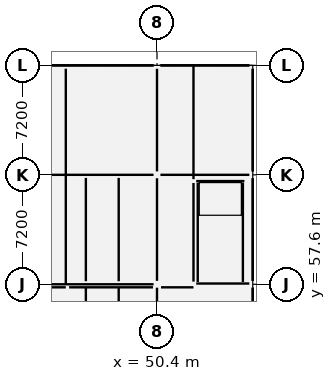
"""IFC4 building model, lengths in metres.
Left out: names, types, materials, properties, quantities, classifications, styles, units other than length and angle.
Written with IfcOpenShell. Run it as: python <this file> out.ifc"""

import sys

from ifc_helpers import new_model, si_unit, direction, frame, frame_2d, origin, origin_2d, place, context, subcontext, project, spatial, rectangle, extrude, element, fill, save


model = new_model("IFC4")
c1 = context("Model", 3, precision=1e-05, world=origin(), true_north=direction((0.0, 1.0)))
c2 = subcontext(c1, "Body", "Model", "MODEL_VIEW")
j1 = project(units=[si_unit("LENGTHUNIT", "METRE"), si_unit("PLANEANGLEUNIT", "RADIAN")], contexts=[c1])
p1 = place(None, origin())
s1 = spatial("IfcSite", under=j1, at=p1, CompositionType="ELEMENT")
p2 = place(p1, origin())
s2 = spatial("IfcBuilding", under=s1, at=p2, CompositionType="ELEMENT")
p3 = place(p2, frame((0.0, 0.0, 5.4)))
s3 = spatial("IfcBuildingStorey", under=s2, at=p3, CompositionType="ELEMENT", Elevation=5.4)
for number, where, z_axis, x_axis in (
    (1, (50.4, 57.6, 0.0), (0.0, 0.0, 1.0), (1.0, 0.0, 0.0)),
    (2, (50.4, 64.8, 0.0), (0.0, 0.0, 1.0), (1.0, 0.0, 0.0)),
    (3, (50.4, 72.0, 0.0), (0.0, 0.0, 1.0), (1.0, 0.0, 0.0)),
    (4, (56.7, 57.6, 0.0), (0.0, 0.0, 1.0), (1.0, 0.0, 0.0)),
    (5, (56.7, 64.8, 0.0), (0.0, 0.0, 1.0), (1.0, 0.0, 0.0)),
    (6, (56.7, 72.0, 0.0), (0.0, 0.0, 1.0), (1.0, 0.0, 0.0)),
):
    element("IfcColumn", number, at=place(p3, frame(where, z_axis=z_axis, x_axis=x_axis)), inside=s3, PredefinedType="COLUMN", context=c2, shape_type="SweptSolid", body=[
        extrude(rectangle(XDim=0.45, YDim=0.45, at=origin_2d()), origin(), (0.0, 0.0, 1.0), 4.2),
    ])
p4 = place(p3, frame((52.98, 57.65, 0.0), z_axis=(0.0, 0.0, 1.0), x_axis=(1.0, 0.0, 0.0)))
e7 = element("IfcWall", 7, at=p4, inside=s3, PredefinedType="SHEAR", context=c2, shape_type="SweptSolid", body=[
    extrude(rectangle(XDim=3.495, YDim=0.2, at=frame_2d((1.748, 0.0))), origin(), (0.0, 0.0, 1.0), 3.95),
])
p5 = place(p4, frame((1.198, 0.0, 0.0)))
e8 = element("IfcOpeningElement", 8, at=p5, cuts=e7, PredefinedType="OPENING", context=c2, shape_type="SweptSolid", body=[
    extrude(rectangle(XDim=1.1, YDim=2.15, at=frame_2d((0.55, 1.075))), frame((0.0, 0.112, 0.0), z_axis=(0.0, -1.0, 0.0), x_axis=(1.0, 0.0, 0.0)), (0.0, 0.0, 1.0), 0.224),
])
p6 = place(p3, frame((52.98, 64.39, 0.0), z_axis=(0.0, 0.0, 1.0), x_axis=(1.0, 0.0, 0.0)))
e9 = element("IfcWall", 9, at=p6, inside=s3, PredefinedType="SHEAR", context=c2, shape_type="SweptSolid", body=[
    extrude(rectangle(XDim=3.17, YDim=0.2, at=frame_2d((1.585, 0.0))), origin(), (0.0, 0.0, 1.0), 3.95),
])
for number, where, z_axis, x_axis in (
    (10, (53.08, 57.75, 0.0), (0.0, 0.0, 1.0), (0.0, 1.0, 0.0)),
    (11, (56.05, 57.75, 0.0), (0.0, 0.0, 1.0), (0.0, 1.0, 0.0)),
):
    element("IfcWall", number, at=place(p3, frame(where, z_axis=z_axis, x_axis=x_axis)), inside=s3, PredefinedType="SHEAR", context=c2, shape_type="SweptSolid", body=[
        extrude(rectangle(XDim=6.54, YDim=0.2, at=frame_2d((3.27, 0.0))), origin(), (0.0, 0.0, 1.0), 3.95),
    ])
p7 = place(p3, frame((56.7, 61.0, 0.0), z_axis=(0.0, 0.0, 1.0), x_axis=(0.0, 1.0, 0.0)))
e12 = element("IfcWall", 12, at=p7, inside=s3, PredefinedType="SOLIDWALL", context=c2, shape_type="SweptSolid", body=[
    extrude(rectangle(XDim=0.4, YDim=0.36, at=frame_2d((0.2, 0.0))), origin(), (0.0, 0.0, 1.0), 3.34),
])
p8 = place(p3, frame((56.7, 68.2, 0.0), z_axis=(0.0, 0.0, 1.0), x_axis=(0.0, 1.0, 0.0)))
e13 = element("IfcWall", 13, at=p8, inside=s3, PredefinedType="SOLIDWALL", context=c2, shape_type="SweptSolid", body=[
    extrude(rectangle(XDim=0.4, YDim=0.36, at=frame_2d((0.2, 0.0))), origin(), (0.0, 0.0, 1.0), 3.29),
])
p9 = place(p3, frame((53.75, 72.0, 0.0), z_axis=(0.0, 0.0, 1.0), x_axis=(-1.0, 0.0, 0.0)))
e14 = element("IfcWall", 14, at=p9, inside=s3, PredefinedType="SOLIDWALL", context=c2, shape_type="SweptSolid", body=[
    extrude(rectangle(XDim=0.4, YDim=0.36, at=frame_2d((0.2, 0.0))), origin(), (0.0, 0.0, 1.0), 3.29),
])
p10 = place(p3, frame((50.175, 72.0, 0.0), z_axis=(0.0, 0.0, 1.0), x_axis=(-1.0, 0.0, 0.0)))
e15 = element("IfcWall", 15, at=p10, inside=s3, PredefinedType="ELEMENTEDWALL", context=c2, shape_type="SweptSolid", body=[
    extrude(rectangle(XDim=6.75, YDim=0.32, at=frame_2d((3.375, 0.0))), origin(), (0.0, 0.0, 1.0), 3.29),
])
p11 = place(p10, frame((2.775, 0.0, 0.85)))
e16 = element("IfcOpeningElement", 16, at=p11, cuts=e15, PredefinedType="OPENING", context=c2, shape_type="SweptSolid", body=[
    extrude(rectangle(XDim=1.2, YDim=2.2, at=frame_2d((0.6, 1.1))), frame((0.0, 0.172, 0.0), z_axis=(0.0, -1.0, 0.0), x_axis=(1.0, 0.0, 0.0)), (0.0, 0.0, 1.0), 0.344),
])
p12 = place(p3, frame((43.465, 57.4, 0.0), z_axis=(0.0, 0.0, 1.0), x_axis=(1.0, 0.0, 0.0)))
e17 = element("IfcWall", 17, at=p12, inside=s3, PredefinedType="STANDARD", context=c2, shape_type="SweptSolid", body=[
    extrude(rectangle(XDim=0.935, YDim=0.15, at=frame_2d((0.467, 0.0))), origin(), (0.0, 0.0, 1.0), 3.188),
])
p13 = place(p3, frame((44.4, 57.62, 0.0), z_axis=(0.0, 0.0, 1.0), x_axis=(0.0, 1.0, 0.0)))
e18 = element("IfcWall", 18, at=p13, inside=s3, PredefinedType="STANDARD", context=c2, shape_type="SweptSolid", body=[
    extrude(rectangle(XDim=14.16, YDim=0.15, at=frame_2d((7.08, 0.0))), origin(), (0.0, 0.0, 1.0), 3.188),
])
p14 = place(p3, frame((44.62, 57.4, 0.0), z_axis=(0.0, 0.0, 1.0), x_axis=(1.0, 0.0, 0.0)))
e19 = element("IfcWall", 19, at=p14, inside=s3, PredefinedType="PARTITIONING", context=c2, shape_type="SweptSolid", body=[
    extrude(rectangle(XDim=5.515, YDim=0.1, at=frame_2d((2.757, 0.0))), origin(), (0.0, 0.0, 1.0), 3.188),
])
p15 = place(p14, frame((2.232, 0.0, 0.0)))
e20 = element("IfcOpeningElement", 20, at=p15, cuts=e19, PredefinedType="OPENING", context=c2, shape_type="SweptSolid", body=[
    extrude(rectangle(XDim=1.05, YDim=2.15, at=frame_2d((0.525, 1.075))), frame((0.0, 0.062, 0.0), z_axis=(0.0, -1.0, 0.0), x_axis=(1.0, 0.0, 0.0)), (0.0, 0.0, 1.0), 0.124),
])
p16 = place(p3, frame((50.665, 57.4, 0.0), z_axis=(0.0, 0.0, 1.0), x_axis=(1.0, 0.0, 0.0)))
e21 = element("IfcWall", 21, at=p16, inside=s3, PredefinedType="PARTITIONING", context=c2, shape_type="SweptSolid", body=[
    extrude(rectangle(XDim=2.135, YDim=0.1, at=frame_2d((1.067, 0.0))), origin(), (0.0, 0.0, 1.0), 3.92),
])
p17 = place(p3, frame((52.8, 57.776, 0.0), z_axis=(0.0, 0.0, 1.0), x_axis=(0.0, 1.0, 0.0)))
e22 = element("IfcWall", 22, at=p17, inside=s3, PredefinedType="PARTITIONING", context=c2, shape_type="SweptSolid", body=[
    extrude(rectangle(XDim=6.488, YDim=0.1, at=frame_2d((3.244, 0.0))), origin(), (0.0, 0.0, 1.0), 3.92),
])
p18 = place(p3, frame((52.8, 64.516, 0.0), z_axis=(0.0, 0.0, 1.0), x_axis=(0.0, 1.0, 0.0)))
e23 = element("IfcWall", 23, at=p18, inside=s3, PredefinedType="PARTITIONING", context=c2, shape_type="SweptSolid", body=[
    extrude(rectangle(XDim=7.484, YDim=0.1, at=frame_2d((3.742, 0.0))), origin(), (0.0, 0.0, 1.0), 3.188),
])
p19 = place(p11, origin())
e24 = element("IfcWindow", 24, at=p19, inside=s3, PartitioningType="SINGLE_PANEL", PredefinedType="WINDOW", context=c2, shape_type="SweptSolid", body=[
    extrude(rectangle(XDim=1.2, YDim=2.2, at=frame_2d((0.6, 1.1))), frame((0.0, 0.03, 0.0), z_axis=(0.0, -1.0, 0.0), x_axis=(1.0, 0.0, 0.0)), (0.0, 0.0, 1.0), 0.06),
])
fill(e16, e24)
p20 = place(p5, origin())
e25 = element("IfcDoor", 25, at=p20, inside=s3, OperationType="SINGLE_SWING_LEFT", PredefinedType="DOOR", context=c2, shape_type="SweptSolid", body=[
    extrude(rectangle(XDim=1.1, YDim=2.15, at=frame_2d((0.55, 1.075))), frame((0.0, 0.025, 0.0), z_axis=(0.0, -1.0, 0.0), x_axis=(1.0, 0.0, 0.0)), (0.0, 0.0, 1.0), 0.05),
])
fill(e8, e25)
p21 = place(p15, origin())
e26 = element("IfcDoor", 26, at=p21, inside=s3, OperationType="SINGLE_SWING_RIGHT", PredefinedType="DOOR", context=c2, shape_type="SweptSolid", body=[
    extrude(rectangle(XDim=1.05, YDim=2.15, at=frame_2d((0.525, 1.075))), frame((0.0, 0.025, 0.0), z_axis=(0.0, -1.0, 0.0), x_axis=(1.0, 0.0, 0.0)), (0.0, 0.0, 1.0), 0.05),
])
fill(e20, e26)
save(model, sys.argv[1])
